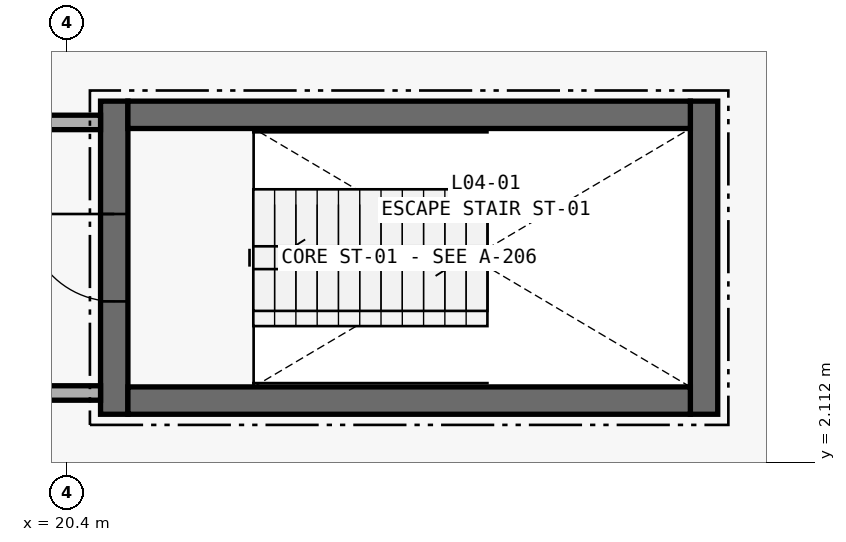
"""IFC4 building model, lengths in metres.
Left out: names, types, materials, properties, quantities, classifications, styles, units other than length and angle.
Written with IfcOpenShell. Run it as: python <this file> out.ifc"""

import sys

from ifc_helpers import new_model, si_unit, direction, frame, frame_2d, origin, place, context, subcontext, project, spatial, rectangle, extrude, element, fill, save


model = new_model("IFC4")
c1 = context("Model", 3, precision=1e-05, world=origin(), true_north=direction((0.0, 1.0)))
c2 = subcontext(c1, "Body", "Model", "MODEL_VIEW")
j1 = project(units=[si_unit("LENGTHUNIT", "METRE"), si_unit("PLANEANGLEUNIT", "RADIAN")], contexts=[c1])
p1 = place(None, origin())
s1 = spatial("IfcSite", under=j1, at=p1, CompositionType="ELEMENT")
p2 = place(p1, origin())
s2 = spatial("IfcBuilding", under=s1, at=p2, CompositionType="ELEMENT")
p3 = place(p2, frame((0.0, 0.0, 21.3)))
s3 = spatial("IfcBuildingStorey", under=s2, at=p3, CompositionType="ELEMENT", Elevation=21.3)
p4 = place(p3, frame((21.02, 2.74, 0.0), z_axis=(0.0, 0.0, 1.0), x_axis=(0.0, 1.0, 0.0)))
e1 = element("IfcWall", 1, at=p4, inside=s3, PredefinedType="SHEAR", context=c2, shape_type="SweptSolid", body=[
    extrude(rectangle(XDim=4.12, YDim=0.36, at=frame_2d((2.06, 0.0))), origin(), (0.0, 0.0, 1.0), 3.95),
])
p5 = place(p4, frame((1.485, 0.0, 0.0)))
e2 = element("IfcOpeningElement", 2, at=p5, cuts=e1, PredefinedType="OPENING", context=c2, shape_type="SweptSolid", body=[
    extrude(rectangle(XDim=1.15, YDim=2.15, at=frame_2d((0.575, 1.075))), frame((0.0, 0.195, 0.0), z_axis=(0.0, -1.0, 0.0), x_axis=(1.0, 0.0, 0.0)), (0.0, 0.0, 1.0), 0.39),
])
p6 = place(p3, frame((28.78, 2.74, 0.0), z_axis=(0.0, 0.0, 1.0), x_axis=(0.0, 1.0, 0.0)))
e3 = element("IfcWall", 3, at=p6, inside=s3, PredefinedType="SHEAR", context=c2, shape_type="SweptSolid", body=[
    extrude(rectangle(XDim=4.12, YDim=0.36, at=frame_2d((2.06, 0.0))), origin(), (0.0, 0.0, 1.0), 3.95),
])
for number, where, z_axis, x_axis in (
    (4, (21.2, 6.68, 0.0), (0.0, 0.0, 1.0), (1.0, 0.0, 0.0)),
    (5, (21.2, 2.92, 0.0), (0.0, 0.0, 1.0), (1.0, 0.0, 0.0)),
):
    element("IfcWall", number, at=place(p3, frame(where, z_axis=z_axis, x_axis=x_axis)), inside=s3, PredefinedType="SHEAR", context=c2, shape_type="SweptSolid", body=[
        extrude(rectangle(XDim=7.4, YDim=0.36, at=frame_2d((3.7, 0.0))), origin(), (0.0, 0.0, 1.0), 3.95),
    ])
p7 = place(p3, frame((16.825, 3.02, 0.0), z_axis=(0.0, 0.0, 1.0), x_axis=(1.0, 0.0, 0.0)))
e6 = element("IfcWall", 6, at=p7, inside=s3, PredefinedType="PARTITIONING", context=c2, shape_type="SweptSolid", body=[
    extrude(rectangle(XDim=4.015, YDim=0.19, at=frame_2d((2.008, 0.0))), origin(), (0.0, 0.0, 1.0), 2.83),
])
p8 = place(p3, frame((19.685, 6.58, 0.0), z_axis=(0.0, 0.0, 1.0), x_axis=(1.0, 0.0, 0.0)))
e7 = element("IfcWall", 7, at=p8, inside=s3, PredefinedType="PARTITIONING", context=c2, shape_type="SweptSolid", body=[
    extrude(rectangle(XDim=1.155, YDim=0.19, at=frame_2d((0.578, 0.0))), origin(), (0.0, 0.0, 1.0), 2.83),
])
p9 = place(p5, origin())
e8 = element("IfcDoor", 8, at=p9, inside=s3, OperationType="SINGLE_SWING_RIGHT", PredefinedType="DOOR", context=c2, shape_type="SweptSolid", body=[
    extrude(rectangle(XDim=1.15, YDim=2.15, at=frame_2d((0.575, 1.075))), frame((0.0, 0.025, 0.0), z_axis=(0.0, -1.0, 0.0), x_axis=(1.0, 0.0, 0.0)), (0.0, 0.0, 1.0), 0.05),
])
fill(e2, e8)
save(model, sys.argv[1])
